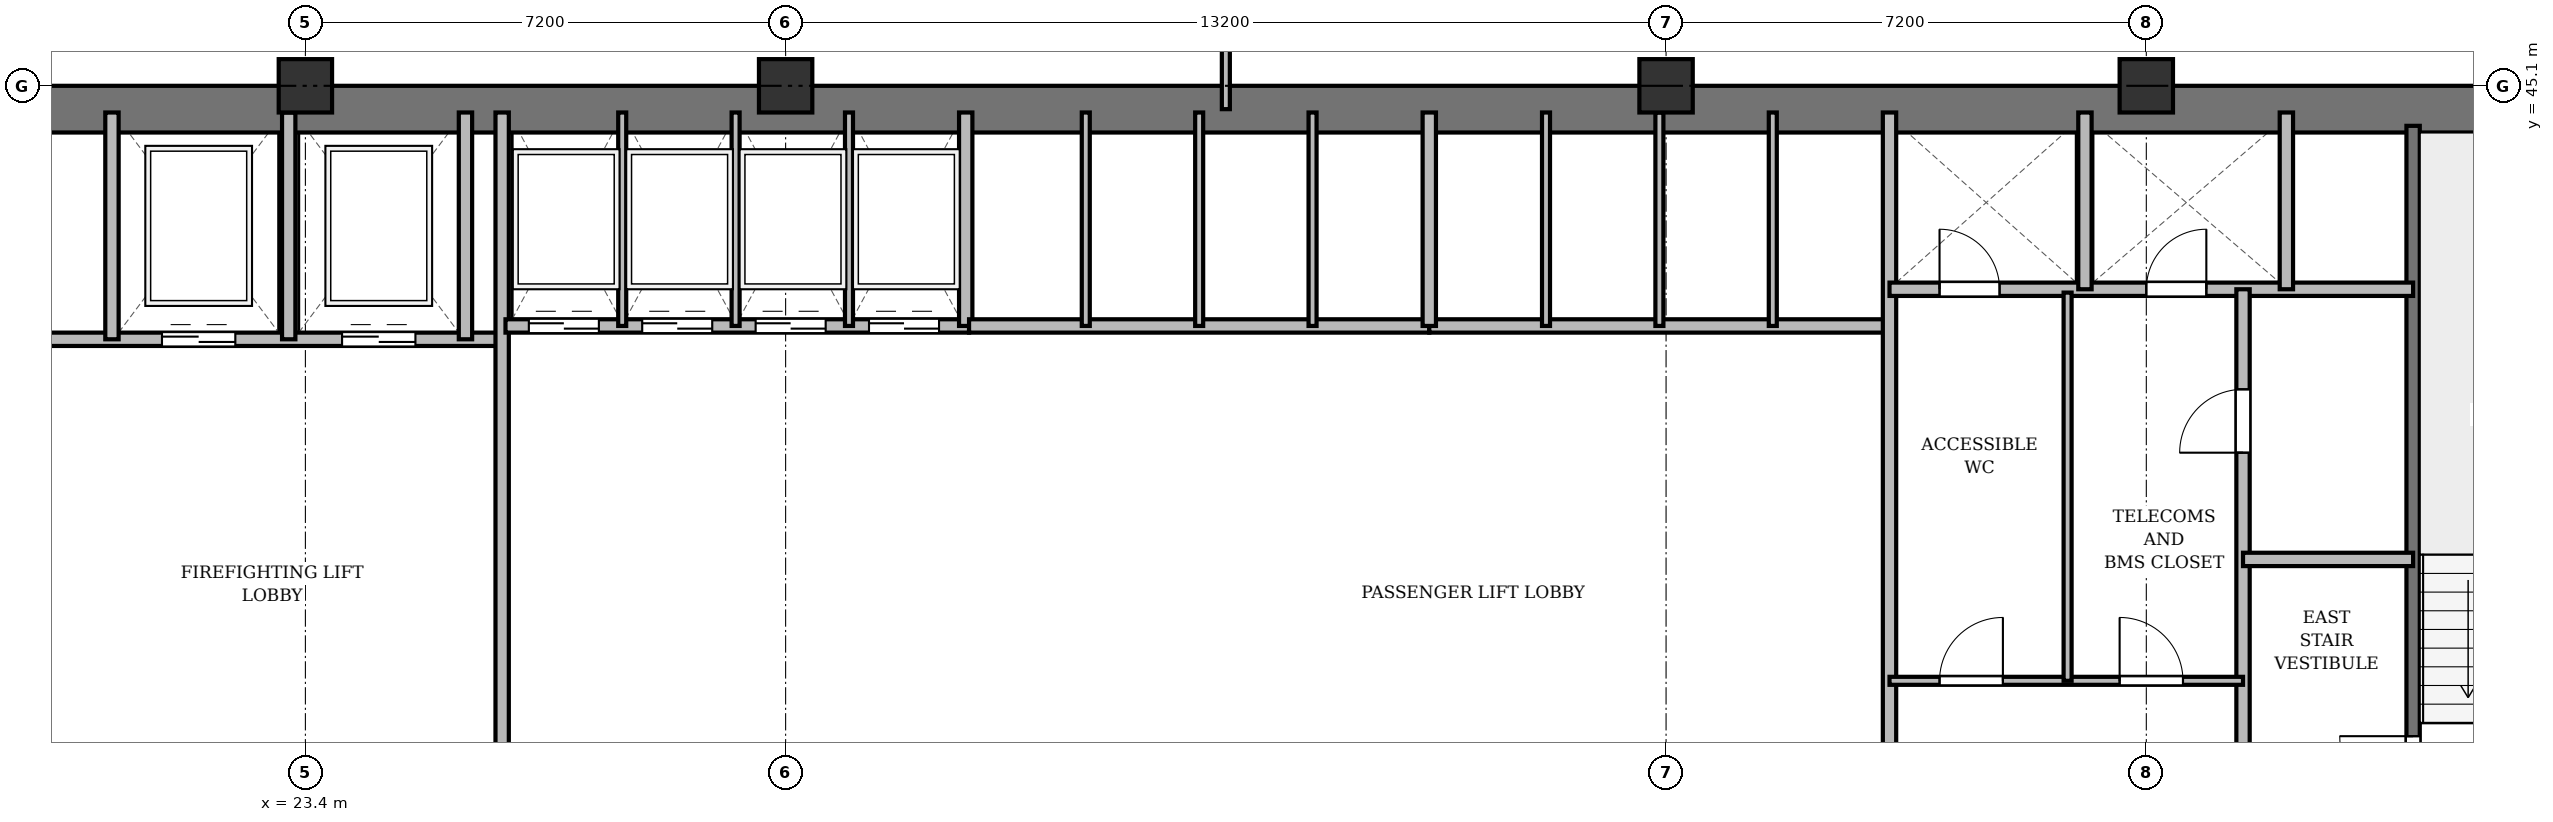
"""IFC4 building model, lengths in metres.
Left out: names, types, materials, properties, quantities, classifications, styles, units other than length and angle.
Written with IfcOpenShell. Run it as: python <this file> out.ifc"""

import sys

from ifc_helpers import new_model, si_unit, direction, frame, frame_2d, origin, origin_2d, place, context, subcontext, project, spatial, rectangle, extrude, source, transform, mapped, element, fill, save


model = new_model("IFC4")
c1 = context("Model", 3, precision=1e-05, world=origin(), true_north=direction((0.0, 1.0)))
c2 = subcontext(c1, "Body", "Model", "MODEL_VIEW")
j1 = project(units=[si_unit("LENGTHUNIT", "METRE"), si_unit("PLANEANGLEUNIT", "RADIAN")], contexts=[c1])
p1 = place(None, origin())
s1 = spatial("IfcSite", under=j1, at=p1, CompositionType="ELEMENT")
p2 = place(p1, origin())
s2 = spatial("IfcBuilding", under=s1, at=p2, CompositionType="ELEMENT")
p3 = place(p2, frame((0.0, 0.0, 114.1)))
s3 = spatial("IfcBuildingStorey", under=s2, at=p3, CompositionType="ELEMENT", Elevation=114.1)
m1 = source(origin(), c2, "Body", "SweptSolid", [
    extrude(rectangle(XDim=0.8, YDim=0.8, at=origin_2d()), origin(), (0.0, 0.0, 1.0), 3.6),
])
for number, where, z_axis, x_axis in (
    (1, (23.4, 45.1, 0.0), (0.0, 0.0, 1.0), (1.0, 0.0, 0.0)),
    (2, (30.6, 45.1, 0.0), (0.0, 0.0, 1.0), (1.0, 0.0, 0.0)),
    (3, (43.8, 45.1, 0.0), (0.0, 0.0, 1.0), (1.0, 0.0, 0.0)),
    (4, (51.0, 45.1, 0.0), (0.0, 0.0, 1.0), (1.0, 0.0, 0.0)),
):
    element("IfcColumn", number, at=place(p3, frame(where, z_axis=z_axis, x_axis=x_axis)), inside=s3, PredefinedType="COLUMN", context=c2, shape_type="MappedRepresentation", body=[
        mapped(m1, transform((0.0, 0.0, 0.0), x_axis=(1.0, 0.0, 0.0), y_axis=(0.0, 1.0, 0.0), z_axis=(0.0, 0.0, 1.0), scale=1.0)),
    ])
p4 = place(p3, frame((15.5, 44.75, 0.0), z_axis=(0.0, 0.0, 1.0), x_axis=(1.0, 0.0, 0.0)))
e5 = element("IfcWall", 5, at=p4, inside=s3, PredefinedType="SHEAR", context=c2, shape_type="SweptSolid", body=[
    extrude(rectangle(XDim=43.4, YDim=0.7, at=frame_2d((21.7, 0.0))), origin(), (0.0, 0.0, 1.0), 3.34),
])
p5 = place(p3, frame((55.0, 33.4, 0.0), z_axis=(0.0, 0.0, 1.0), x_axis=(0.0, 1.0, 0.0)))
e6 = element("IfcWall", 6, at=p5, inside=s3, PredefinedType="SHEAR", context=c2, shape_type="SweptSolid", body=[
    extrude(rectangle(XDim=11.1, YDim=0.2, at=frame_2d((5.55, 0.0))), origin(), (0.0, 0.0, 1.0), 3.34),
])
p6 = place(p5, frame((0.85, 0.0, 0.0)))
e7 = element("IfcOpeningElement", 7, at=p6, cuts=e6, PredefinedType="OPENING", context=c2, shape_type="SweptSolid", body=[
    extrude(rectangle(XDim=1.1, YDim=2.15, at=frame_2d((0.55, 1.075))), frame((0.0, 0.11, 0.0), z_axis=(0.0, -1.0, 0.0), x_axis=(1.0, 0.0, 0.0)), (0.0, 0.0, 1.0), 0.22),
])
p7 = place(p3, frame((19.55, 41.3, 0.0), z_axis=(0.0, 0.0, 1.0), x_axis=(1.0, 0.0, 0.0)))
e8 = element("IfcWall", 8, at=p7, inside=s3, PredefinedType="SOLIDWALL", context=c2, shape_type="SweptSolid", body=[
    extrude(rectangle(XDim=6.75, YDim=0.2, at=frame_2d((3.375, 0.0))), origin(), (0.0, 0.0, 1.0), 3.34),
])
p8 = place(p7, frame((1.7, 0.0, 0.0)))
e9 = element("IfcOpeningElement", 9, at=p8, cuts=e8, PredefinedType="OPENING", context=c2, shape_type="SweptSolid", body=[
    extrude(rectangle(XDim=1.1, YDim=2.15, at=frame_2d((0.55, 1.075))), frame((0.0, 0.11, 0.0), z_axis=(0.0, -1.0, 0.0), x_axis=(1.0, 0.0, 0.0)), (0.0, 0.0, 1.0), 0.22),
])
p9 = place(p7, frame((4.4, 0.0, 0.0)))
e10 = element("IfcOpeningElement", 10, at=p9, cuts=e8, PredefinedType="OPENING", context=c2, shape_type="SweptSolid", body=[
    extrude(rectangle(XDim=1.1, YDim=2.15, at=frame_2d((0.55, 1.075))), frame((0.0, 0.11, 0.0), z_axis=(0.0, -1.0, 0.0), x_axis=(1.0, 0.0, 0.0)), (0.0, 0.0, 1.0), 0.22),
])
for number, where, z_axis, x_axis in (
    (11, (20.5, 41.3, 0.0), (0.0, 0.0, 1.0), (0.0, 1.0, 0.0)),
    (12, (23.15, 41.3, 0.0), (0.0, 0.0, 1.0), (0.0, 1.0, 0.0)),
    (13, (25.8, 41.3, 0.0), (0.0, 0.0, 1.0), (0.0, 1.0, 0.0)),
):
    element("IfcWall", number, at=place(p3, frame(where, z_axis=z_axis, x_axis=x_axis)), inside=s3, PredefinedType="SOLIDWALL", context=c2, shape_type="SweptSolid", body=[
        extrude(rectangle(XDim=3.4, YDim=0.2, at=frame_2d((1.7, 0.0))), origin(), (0.0, 0.0, 1.0), 3.34),
    ])
p10 = place(p3, frame((26.35, 33.4, 0.0), z_axis=(0.0, 0.0, 1.0), x_axis=(0.0, 1.0, 0.0)))
e14 = element("IfcWall", 14, at=p10, inside=s3, PredefinedType="SOLIDWALL", context=c2, shape_type="SweptSolid", body=[
    extrude(rectangle(XDim=11.3, YDim=0.2, at=frame_2d((5.65, 0.0))), origin(), (0.0, 0.0, 1.0), 2.752),
])
p11 = place(p3, frame((26.4, 41.5, 0.0), z_axis=(0.0, 0.0, 1.0), x_axis=(1.0, 0.0, 0.0)))
e15 = element("IfcWall", 15, at=p11, inside=s3, PredefinedType="SOLIDWALL", context=c2, shape_type="SweptSolid", body=[
    extrude(rectangle(XDim=6.95, YDim=0.2, at=frame_2d((3.475, 0.0))), origin(), (0.0, 0.0, 1.0), 3.34),
])
p12 = place(p11, frame((0.35, 0.0, 0.0)))
e16 = element("IfcOpeningElement", 16, at=p12, cuts=e15, PredefinedType="OPENING", context=c2, shape_type="SweptSolid", body=[
    extrude(rectangle(XDim=1.05, YDim=2.15, at=frame_2d((0.525, 1.075))), frame((0.0, 0.11, 0.0), z_axis=(0.0, -1.0, 0.0), x_axis=(1.0, 0.0, 0.0)), (0.0, 0.0, 1.0), 0.22),
])
p13 = place(p11, frame((2.05, 0.0, 0.0)))
e17 = element("IfcOpeningElement", 17, at=p13, cuts=e15, PredefinedType="OPENING", context=c2, shape_type="SweptSolid", body=[
    extrude(rectangle(XDim=1.05, YDim=2.15, at=frame_2d((0.525, 1.075))), frame((0.0, 0.11, 0.0), z_axis=(0.0, -1.0, 0.0), x_axis=(1.0, 0.0, 0.0)), (0.0, 0.0, 1.0), 0.22),
])
p14 = place(p11, frame((3.75, 0.0, 0.0)))
e18 = element("IfcOpeningElement", 18, at=p14, cuts=e15, PredefinedType="OPENING", context=c2, shape_type="SweptSolid", body=[
    extrude(rectangle(XDim=1.05, YDim=2.15, at=frame_2d((0.525, 1.075))), frame((0.0, 0.11, 0.0), z_axis=(0.0, -1.0, 0.0), x_axis=(1.0, 0.0, 0.0)), (0.0, 0.0, 1.0), 0.22),
])
p15 = place(p11, frame((5.45, 0.0, 0.0)))
e19 = element("IfcOpeningElement", 19, at=p15, cuts=e15, PredefinedType="OPENING", context=c2, shape_type="SweptSolid", body=[
    extrude(rectangle(XDim=1.05, YDim=2.15, at=frame_2d((0.525, 1.075))), frame((0.0, 0.11, 0.0), z_axis=(0.0, -1.0, 0.0), x_axis=(1.0, 0.0, 0.0)), (0.0, 0.0, 1.0), 0.22),
])
p16 = place(p3, frame((33.3, 41.5, 0.0), z_axis=(0.0, 0.0, 1.0), x_axis=(0.0, 1.0, 0.0)))
e20 = element("IfcWall", 20, at=p16, inside=s3, PredefinedType="SOLIDWALL", context=c2, shape_type="SweptSolid", body=[
    extrude(rectangle(XDim=3.2, YDim=0.2, at=frame_2d((1.6, 0.0))), origin(), (0.0, 0.0, 1.0), 3.34),
])
for number, where, z_axis, x_axis in (
    (21, (28.15, 41.5, 0.0), (0.0, 0.0, 1.0), (0.0, 1.0, 0.0)),
    (22, (29.85, 41.5, 0.0), (0.0, 0.0, 1.0), (0.0, 1.0, 0.0)),
    (23, (31.55, 41.5, 0.0), (0.0, 0.0, 1.0), (0.0, 1.0, 0.0)),
):
    element("IfcWall", number, at=place(p3, frame(where, z_axis=z_axis, x_axis=x_axis)), inside=s3, PredefinedType="PARTITIONING", context=c2, shape_type="SweptSolid", body=[
        extrude(rectangle(XDim=3.2, YDim=0.12, at=frame_2d((1.6, 0.0))), origin(), (0.0, 0.0, 1.0), 3.34),
    ])
p17 = place(p3, frame((33.35, 41.5, 0.0), z_axis=(0.0, 0.0, 1.0), x_axis=(1.0, 0.0, 0.0)))
e24 = element("IfcWall", 24, at=p17, inside=s3, PredefinedType="SOLIDWALL", context=c2, shape_type="SweptSolid", body=[
    extrude(rectangle(XDim=6.9, YDim=0.2, at=frame_2d((3.45, 0.0))), origin(), (0.0, 0.0, 1.0), 3.34),
])
for number, where, z_axis, x_axis in (
    (25, (35.1, 41.5, 0.0), (0.0, 0.0, 1.0), (0.0, 1.0, 0.0)),
    (26, (36.8, 41.5, 0.0), (0.0, 0.0, 1.0), (0.0, 1.0, 0.0)),
    (27, (38.5, 41.5, 0.0), (0.0, 0.0, 1.0), (0.0, 1.0, 0.0)),
):
    element("IfcWall", number, at=place(p3, frame(where, z_axis=z_axis, x_axis=x_axis)), inside=s3, PredefinedType="PARTITIONING", context=c2, shape_type="SweptSolid", body=[
        extrude(rectangle(XDim=3.2, YDim=0.12, at=frame_2d((1.6, 0.0))), origin(), (0.0, 0.0, 1.0), 3.34),
    ])
p18 = place(p3, frame((40.25, 41.5, 0.0), z_axis=(0.0, 0.0, 1.0), x_axis=(1.0, 0.0, 0.0)))
e28 = element("IfcWall", 28, at=p18, inside=s3, PredefinedType="SOLIDWALL", context=c2, shape_type="SweptSolid", body=[
    extrude(rectangle(XDim=6.9, YDim=0.2, at=frame_2d((3.45, 0.0))), origin(), (0.0, 0.0, 1.0), 2.84),
])
p19 = place(p3, frame((40.25, 41.5, 0.0), z_axis=(0.0, 0.0, 1.0), x_axis=(0.0, 1.0, 0.0)))
e29 = element("IfcWall", 29, at=p19, inside=s3, PredefinedType="SOLIDWALL", context=c2, shape_type="SweptSolid", body=[
    extrude(rectangle(XDim=3.2, YDim=0.2, at=frame_2d((1.6, 0.0))), origin(), (0.0, 0.0, 1.0), 3.34),
])
p20 = place(p3, frame((42.0, 41.5, 0.0), z_axis=(0.0, 0.0, 1.0), x_axis=(0.0, 1.0, 0.0)))
e30 = element("IfcWall", 30, at=p20, inside=s3, PredefinedType="PARTITIONING", context=c2, shape_type="SweptSolid", body=[
    extrude(rectangle(XDim=3.2, YDim=0.12, at=frame_2d((1.6, 0.0))), origin(), (0.0, 0.0, 1.0), 3.34),
])
p21 = place(p3, frame((43.7, 41.5, 0.0), z_axis=(0.0, 0.0, 1.0), x_axis=(0.0, 1.0, 0.0)))
e31 = element("IfcWall", 31, at=p21, inside=s3, PredefinedType="PARTITIONING", context=c2, shape_type="SweptSolid", body=[
    extrude(rectangle(XDim=3.2, YDim=0.12, at=frame_2d((1.6, 0.0))), origin(), (0.0, 0.0, 1.0), 2.84),
])
p22 = place(p3, frame((45.4, 41.5, 0.0), z_axis=(0.0, 0.0, 1.0), x_axis=(0.0, 1.0, 0.0)))
e32 = element("IfcWall", 32, at=p22, inside=s3, PredefinedType="PARTITIONING", context=c2, shape_type="SweptSolid", body=[
    extrude(rectangle(XDim=3.2, YDim=0.12, at=frame_2d((1.6, 0.0))), origin(), (0.0, 0.0, 1.0), 3.34),
])
p23 = place(p3, frame((47.15, 33.4, 0.0), z_axis=(0.0, 0.0, 1.0), x_axis=(0.0, 1.0, 0.0)))
e33 = element("IfcWall", 33, at=p23, inside=s3, PredefinedType="SOLIDWALL", context=c2, shape_type="SweptSolid", body=[
    extrude(rectangle(XDim=11.3, YDim=0.2, at=frame_2d((5.65, 0.0))), origin(), (0.0, 0.0, 1.0), 2.752),
])
p24 = place(p3, frame((47.15, 42.05, 0.0), z_axis=(0.0, 0.0, 1.0), x_axis=(1.0, 0.0, 0.0)))
e34 = element("IfcWall", 34, at=p24, inside=s3, PredefinedType="SOLIDWALL", context=c2, shape_type="SweptSolid", body=[
    extrude(rectangle(XDim=7.85, YDim=0.2, at=frame_2d((3.925, 0.0))), origin(), (0.0, 0.0, 1.0), 2.84),
])
p25 = place(p24, frame((0.75, 0.0, 0.0)))
e35 = element("IfcOpeningElement", 35, at=p25, cuts=e34, PredefinedType="OPENING", context=c2, shape_type="SweptSolid", body=[
    extrude(rectangle(XDim=0.9, YDim=2.1, at=frame_2d((0.45, 1.05))), frame((0.0, 0.11, 0.0), z_axis=(0.0, -1.0, 0.0), x_axis=(1.0, 0.0, 0.0)), (0.0, 0.0, 1.0), 0.22),
])
p26 = place(p24, frame((3.85, 0.0, 0.0)))
e36 = element("IfcOpeningElement", 36, at=p26, cuts=e34, PredefinedType="OPENING", context=c2, shape_type="SweptSolid", body=[
    extrude(rectangle(XDim=0.9, YDim=2.1, at=frame_2d((0.45, 1.05))), frame((0.0, 0.11, 0.0), z_axis=(0.0, -1.0, 0.0), x_axis=(1.0, 0.0, 0.0)), (0.0, 0.0, 1.0), 0.22),
])
for number, where, z_axis, x_axis in (
    (37, (50.08, 42.05, 0.0), (0.0, 0.0, 1.0), (0.0, 1.0, 0.0)),
    (38, (53.1, 42.05, 0.0), (0.0, 0.0, 1.0), (0.0, 1.0, 0.0)),
):
    element("IfcWall", number, at=place(p3, frame(where, z_axis=z_axis, x_axis=x_axis)), inside=s3, PredefinedType="SOLIDWALL", context=c2, shape_type="SweptSolid", body=[
        extrude(rectangle(XDim=2.65, YDim=0.2, at=frame_2d((1.325, 0.0))), origin(), (0.0, 0.0, 1.0), 3.34),
    ])
p27 = place(p3, frame((52.45, 33.4, 0.0), z_axis=(0.0, 0.0, 1.0), x_axis=(0.0, 1.0, 0.0)))
e39 = element("IfcWall", 39, at=p27, inside=s3, PredefinedType="PARTITIONING", context=c2, shape_type="SweptSolid", body=[
    extrude(rectangle(XDim=8.65, YDim=0.2, at=frame_2d((4.325, 0.0))), origin(), (0.0, 0.0, 1.0), 2.752),
])
p28 = place(p27, frame((6.2, 0.0, 0.0)))
e40 = element("IfcOpeningElement", 40, at=p28, cuts=e39, PredefinedType="OPENING", context=c2, shape_type="SweptSolid", body=[
    extrude(rectangle(XDim=0.95, YDim=2.15, at=frame_2d((0.475, 1.075))), frame((0.0, 0.11, 0.0), z_axis=(0.0, -1.0, 0.0), x_axis=(1.0, 0.0, 0.0)), (0.0, 0.0, 1.0), 0.22),
])
p29 = place(p3, frame((52.45, 38.0, 0.0), z_axis=(0.0, 0.0, 1.0), x_axis=(1.0, 0.0, 0.0)))
e41 = element("IfcWall", 41, at=p29, inside=s3, PredefinedType="PARTITIONING", context=c2, shape_type="SweptSolid", body=[
    extrude(rectangle(XDim=2.55, YDim=0.2, at=frame_2d((1.275, 0.0))), origin(), (0.0, 0.0, 1.0), 3.34),
])
p30 = place(p3, frame((47.15, 36.18, 0.0), z_axis=(0.0, 0.0, 1.0), x_axis=(1.0, 0.0, 0.0)))
e42 = element("IfcWall", 42, at=p30, inside=s3, PredefinedType="PARTITIONING", context=c2, shape_type="SweptSolid", body=[
    extrude(rectangle(XDim=5.3, YDim=0.12, at=frame_2d((2.65, 0.0))), origin(), (0.0, 0.0, 1.0), 2.84),
])
p31 = place(p30, frame((0.75, 0.0, 0.0)))
e43 = element("IfcOpeningElement", 43, at=p31, cuts=e42, PredefinedType="OPENING", context=c2, shape_type="SweptSolid", body=[
    extrude(rectangle(XDim=0.95, YDim=2.15, at=frame_2d((0.475, 1.075))), frame((0.0, 0.07, 0.0), z_axis=(0.0, -1.0, 0.0), x_axis=(1.0, 0.0, 0.0)), (0.0, 0.0, 1.0), 0.14),
])
p32 = place(p30, frame((3.45, 0.0, 0.0)))
e44 = element("IfcOpeningElement", 44, at=p32, cuts=e42, PredefinedType="OPENING", context=c2, shape_type="SweptSolid", body=[
    extrude(rectangle(XDim=0.95, YDim=2.15, at=frame_2d((0.475, 1.075))), frame((0.0, 0.07, 0.0), z_axis=(0.0, -1.0, 0.0), x_axis=(1.0, 0.0, 0.0)), (0.0, 0.0, 1.0), 0.14),
])
p33 = place(p3, frame((49.82, 36.18, 0.0), z_axis=(0.0, 0.0, 1.0), x_axis=(0.0, 1.0, 0.0)))
e45 = element("IfcWall", 45, at=p33, inside=s3, PredefinedType="PARTITIONING", context=c2, shape_type="SweptSolid", body=[
    extrude(rectangle(XDim=5.82, YDim=0.12, at=frame_2d((2.91, 0.0))), origin(), (0.0, 0.0, 1.0), 3.34),
])
p34 = place(p3, frame((37.2, 44.75, 0.0), z_axis=(0.0, 0.0, 1.0), x_axis=(0.0, 1.0, 0.0)))
e46 = element("IfcWall", 46, at=p34, inside=s3, PredefinedType="PARTITIONING", context=c2, shape_type="SweptSolid", body=[
    extrude(rectangle(XDim=3.61, YDim=0.12, at=frame_2d((1.805, 0.0))), origin(), (0.0, 0.0, 1.0), 2.752),
])
p35 = place(p34, frame((1.1, 0.0, 0.0)))
e47 = element("IfcOpeningElement", 47, at=p35, cuts=e46, PredefinedType="OPENING", context=c2, shape_type="SweptSolid", body=[
    extrude(rectangle(XDim=0.95, YDim=2.15, at=frame_2d((0.475, 1.075))), frame((0.0, 0.07, 0.0), z_axis=(0.0, -1.0, 0.0), x_axis=(1.0, 0.0, 0.0)), (0.0, 0.0, 1.0), 0.14),
])
m2 = source(origin(), c2, "Body", "SweptSolid", [
    extrude(rectangle(XDim=1.1, YDim=2.15, at=frame_2d((0.55, 1.075))), frame((0.0, 0.025, 0.0), z_axis=(0.0, -1.0, 0.0), x_axis=(1.0, 0.0, 0.0)), (0.0, 0.0, 1.0), 0.05),
])
p36 = place(p6, origin())
e48 = element("IfcDoor", 48, at=p36, inside=s3, OperationType="SINGLE_SWING_RIGHT", PredefinedType="DOOR", context=c2, shape_type="MappedRepresentation", body=[
    mapped(m2, transform((0.0, 0.0, 0.0), x_axis=(1.0, 0.0, 0.0), y_axis=(0.0, 1.0, 0.0), z_axis=(0.0, 0.0, 1.0), scale=1.0)),
])
fill(e7, e48)
p37 = place(p8, origin())
e49 = element("IfcDoor", 49, at=p37, inside=s3, OperationType="DOUBLE_DOOR_SLIDING", PredefinedType="DOOR", context=c2, shape_type="MappedRepresentation", body=[
    mapped(m2, transform((0.0, 0.0, 0.0), x_axis=(1.0, 0.0, 0.0), y_axis=(0.0, 1.0, 0.0), z_axis=(0.0, 0.0, 1.0), scale=1.0)),
])
fill(e9, e49)
p38 = place(p9, origin())
e50 = element("IfcDoor", 50, at=p38, inside=s3, OperationType="DOUBLE_DOOR_SLIDING", PredefinedType="DOOR", context=c2, shape_type="MappedRepresentation", body=[
    mapped(m2, transform((0.0, 0.0, 0.0), x_axis=(1.0, 0.0, 0.0), y_axis=(0.0, 1.0, 0.0), z_axis=(0.0, 0.0, 1.0), scale=1.0)),
])
fill(e10, e50)
m3 = source(origin(), c2, "Body", "SweptSolid", [
    extrude(rectangle(XDim=1.05, YDim=2.15, at=frame_2d((0.525, 1.075))), frame((0.0, 0.025, 0.0), z_axis=(0.0, -1.0, 0.0), x_axis=(1.0, 0.0, 0.0)), (0.0, 0.0, 1.0), 0.05),
])
p39 = place(p12, origin())
e51 = element("IfcDoor", 51, at=p39, inside=s3, OperationType="DOUBLE_DOOR_SLIDING", PredefinedType="DOOR", context=c2, shape_type="MappedRepresentation", body=[
    mapped(m3, transform((0.0, 0.0, 0.0), x_axis=(1.0, 0.0, 0.0), y_axis=(0.0, 1.0, 0.0), z_axis=(0.0, 0.0, 1.0), scale=1.0)),
])
fill(e16, e51)
p40 = place(p13, origin())
e52 = element("IfcDoor", 52, at=p40, inside=s3, OperationType="DOUBLE_DOOR_SLIDING", PredefinedType="DOOR", context=c2, shape_type="MappedRepresentation", body=[
    mapped(m3, transform((0.0, 0.0, 0.0), x_axis=(1.0, 0.0, 0.0), y_axis=(0.0, 1.0, 0.0), z_axis=(0.0, 0.0, 1.0), scale=1.0)),
])
fill(e17, e52)
p41 = place(p14, origin())
e53 = element("IfcDoor", 53, at=p41, inside=s3, OperationType="DOUBLE_DOOR_SLIDING", PredefinedType="DOOR", context=c2, shape_type="MappedRepresentation", body=[
    mapped(m3, transform((0.0, 0.0, 0.0), x_axis=(1.0, 0.0, 0.0), y_axis=(0.0, 1.0, 0.0), z_axis=(0.0, 0.0, 1.0), scale=1.0)),
])
fill(e18, e53)
p42 = place(p15, origin())
e54 = element("IfcDoor", 54, at=p42, inside=s3, OperationType="DOUBLE_DOOR_SLIDING", PredefinedType="DOOR", context=c2, shape_type="MappedRepresentation", body=[
    mapped(m3, transform((0.0, 0.0, 0.0), x_axis=(1.0, 0.0, 0.0), y_axis=(0.0, 1.0, 0.0), z_axis=(0.0, 0.0, 1.0), scale=1.0)),
])
fill(e19, e54)
m4 = source(origin(), c2, "Body", "SweptSolid", [
    extrude(rectangle(XDim=0.9, YDim=2.1, at=frame_2d((0.45, 1.05))), frame((0.0, 0.025, 0.0), z_axis=(0.0, -1.0, 0.0), x_axis=(1.0, 0.0, 0.0)), (0.0, 0.0, 1.0), 0.05),
])
p43 = place(p25, origin())
e55 = element("IfcDoor", 55, at=p43, inside=s3, OperationType="SINGLE_SWING_LEFT", PredefinedType="DOOR", context=c2, shape_type="MappedRepresentation", body=[
    mapped(m4, transform((0.0, 0.0, 0.0), x_axis=(1.0, 0.0, 0.0), y_axis=(0.0, 1.0, 0.0), z_axis=(0.0, 0.0, 1.0), scale=1.0)),
])
fill(e35, e55)
p44 = place(p26, origin())
e56 = element("IfcDoor", 56, at=p44, inside=s3, OperationType="SINGLE_SWING_RIGHT", PredefinedType="DOOR", context=c2, shape_type="MappedRepresentation", body=[
    mapped(m4, transform((0.0, 0.0, 0.0), x_axis=(1.0, 0.0, 0.0), y_axis=(0.0, 1.0, 0.0), z_axis=(0.0, 0.0, 1.0), scale=1.0)),
])
fill(e36, e56)
m5 = source(origin(), c2, "Body", "SweptSolid", [
    extrude(rectangle(XDim=0.95, YDim=2.15, at=frame_2d((0.475, 1.075))), frame((0.0, 0.025, 0.0), z_axis=(0.0, -1.0, 0.0), x_axis=(1.0, 0.0, 0.0)), (0.0, 0.0, 1.0), 0.05),
])
p45 = place(p28, origin())
e57 = element("IfcDoor", 57, at=p45, inside=s3, OperationType="SINGLE_SWING_LEFT", PredefinedType="DOOR", context=c2, shape_type="MappedRepresentation", body=[
    mapped(m5, transform((0.0, 0.0, 0.0), x_axis=(1.0, 0.0, 0.0), y_axis=(0.0, 1.0, 0.0), z_axis=(0.0, 0.0, 1.0), scale=1.0)),
])
fill(e40, e57)
p46 = place(p31, origin())
e58 = element("IfcDoor", 58, at=p46, inside=s3, OperationType="SINGLE_SWING_RIGHT", PredefinedType="DOOR", context=c2, shape_type="MappedRepresentation", body=[
    mapped(m5, transform((0.0, 0.0, 0.0), x_axis=(1.0, 0.0, 0.0), y_axis=(0.0, 1.0, 0.0), z_axis=(0.0, 0.0, 1.0), scale=1.0)),
])
fill(e43, e58)
p47 = place(p32, origin())
e59 = element("IfcDoor", 59, at=p47, inside=s3, OperationType="SINGLE_SWING_LEFT", PredefinedType="DOOR", context=c2, shape_type="MappedRepresentation", body=[
    mapped(m5, transform((0.0, 0.0, 0.0), x_axis=(1.0, 0.0, 0.0), y_axis=(0.0, 1.0, 0.0), z_axis=(0.0, 0.0, 1.0), scale=1.0)),
])
fill(e44, e59)
save(model, sys.argv[1])
